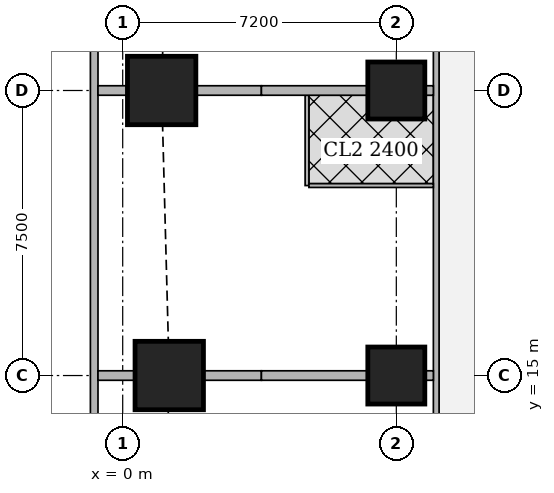
"""IFC4 building model, lengths in metres.
Left out: names, types, materials, properties, quantities, classifications, styles, units other than length and angle.
Written with IfcOpenShell. Run it as: python <this file> out.ifc"""

import sys

from ifc_helpers import new_model, si_unit, direction, frame, frame_2d, origin, origin_2d, place, context, subcontext, project, spatial, rectangle, extrude, element, fill, save


model = new_model("IFC4")
c1 = context("Model", 3, precision=1e-05, world=origin(), true_north=direction((0.0, 1.0)))
c2 = subcontext(c1, "Body", "Model", "MODEL_VIEW")
j1 = project(units=[si_unit("LENGTHUNIT", "METRE"), si_unit("PLANEANGLEUNIT", "RADIAN")], contexts=[c1])
p1 = place(None, origin())
s1 = spatial("IfcSite", under=j1, at=p1, CompositionType="ELEMENT")
p2 = place(p1, origin())
s2 = spatial("IfcBuilding", under=s1, at=p2, CompositionType="ELEMENT")
p3 = place(p2, frame((0.0, 0.0, 169.55)))
s3 = spatial("IfcBuildingStorey", under=s2, at=p3, CompositionType="ELEMENT", Elevation=169.55)
p4 = place(p3, frame((1.225, 15.0, 0.0), z_axis=(0.0, 0.0, 1.0), x_axis=(1.0, 0.0, 0.0)))
e1 = element("IfcColumn", 1, at=p4, inside=s3, PredefinedType="COLUMN", context=c2, shape_type="SweptSolid", body=[
    extrude(rectangle(XDim=1.8, YDim=1.8, at=origin_2d()), origin(), (0.0, 0.0, 1.0), 3.75),
])
p5 = place(p3, frame((7.2, 15.0, 0.0), z_axis=(0.0, 0.0, 1.0), x_axis=(1.0, 0.0, 0.0)))
e2 = element("IfcColumn", 2, at=p5, inside=s3, PredefinedType="COLUMN", context=c2, shape_type="SweptSolid", body=[
    extrude(rectangle(XDim=1.5, YDim=1.5, at=origin_2d()), origin(), (0.0, 0.0, 1.0), 3.75),
])
p6 = place(p3, frame((1.025, 22.5, 0.0), z_axis=(0.0, 0.0, 1.0), x_axis=(1.0, 0.0, 0.0)))
e3 = element("IfcColumn", 3, at=p6, inside=s3, PredefinedType="COLUMN", context=c2, shape_type="SweptSolid", body=[
    extrude(rectangle(XDim=1.8, YDim=1.8, at=origin_2d()), origin(), (0.0, 0.0, 1.0), 3.75),
])
p7 = place(p3, frame((7.2, 22.5, 0.0), z_axis=(0.0, 0.0, 1.0), x_axis=(1.0, 0.0, 0.0)))
e4 = element("IfcColumn", 4, at=p7, inside=s3, PredefinedType="COLUMN", context=c2, shape_type="SweptSolid", body=[
    extrude(rectangle(XDim=1.5, YDim=1.5, at=origin_2d()), origin(), (0.0, 0.0, 1.0), 3.75),
])
p8 = place(p3, frame((-0.75, 42.837, 0.0), z_axis=(0.0, 0.0, 1.0), x_axis=(0.0, -1.0, 0.0)))
e5 = element("IfcWall", 5, at=p8, inside=s3, PredefinedType="SOLIDWALL", context=c2, shape_type="SweptSolid", body=[
    extrude(rectangle(XDim=40.674, YDim=0.2, at=frame_2d((20.337, 0.0))), origin(), (0.0, 0.0, 1.0), 3.5),
])
p9 = place(p8, frame((1.78, 0.0, 0.9)))
e6 = element("IfcOpeningElement", 6, at=p9, cuts=e5, PredefinedType="OPENING", context=c2, shape_type="SweptSolid", body=[
    extrude(rectangle(XDim=1.8, YDim=1.5, at=frame_2d((0.9, 0.75))), frame((0.0, 0.11, 0.0), z_axis=(0.0, -1.0, 0.0), x_axis=(1.0, 0.0, 0.0)), (0.0, 0.0, 1.0), 0.22),
])
p10 = place(p8, frame((6.312, 0.0, 0.9)))
e7 = element("IfcOpeningElement", 7, at=p10, cuts=e5, PredefinedType="OPENING", context=c2, shape_type="SweptSolid", body=[
    extrude(rectangle(XDim=1.8, YDim=1.5, at=frame_2d((0.9, 0.75))), frame((0.0, 0.11, 0.0), z_axis=(0.0, -1.0, 0.0), x_axis=(1.0, 0.0, 0.0)), (0.0, 0.0, 1.0), 0.22),
])
p11 = place(p8, frame((10.062, 0.0, 0.9)))
e8 = element("IfcOpeningElement", 8, at=p11, cuts=e5, PredefinedType="OPENING", context=c2, shape_type="SweptSolid", body=[
    extrude(rectangle(XDim=1.8, YDim=1.5, at=frame_2d((0.9, 0.75))), frame((0.0, 0.11, 0.0), z_axis=(0.0, -1.0, 0.0), x_axis=(1.0, 0.0, 0.0)), (0.0, 0.0, 1.0), 0.22),
])
p12 = place(p8, frame((13.812, 0.0, 0.9)))
e9 = element("IfcOpeningElement", 9, at=p12, cuts=e5, PredefinedType="OPENING", context=c2, shape_type="SweptSolid", body=[
    extrude(rectangle(XDim=1.8, YDim=1.5, at=frame_2d((0.9, 0.75))), frame((0.0, 0.11, 0.0), z_axis=(0.0, -1.0, 0.0), x_axis=(1.0, 0.0, 0.0)), (0.0, 0.0, 1.0), 0.22),
])
p13 = place(p8, frame((17.562, 0.0, 0.9)))
e10 = element("IfcOpeningElement", 10, at=p13, cuts=e5, PredefinedType="OPENING", context=c2, shape_type="SweptSolid", body=[
    extrude(rectangle(XDim=1.8, YDim=1.5, at=frame_2d((0.9, 0.75))), frame((0.0, 0.11, 0.0), z_axis=(0.0, -1.0, 0.0), x_axis=(1.0, 0.0, 0.0)), (0.0, 0.0, 1.0), 0.22),
])
p14 = place(p8, frame((21.312, 0.0, 0.9)))
e11 = element("IfcOpeningElement", 11, at=p14, cuts=e5, PredefinedType="OPENING", context=c2, shape_type="SweptSolid", body=[
    extrude(rectangle(XDim=1.8, YDim=1.5, at=frame_2d((0.9, 0.75))), frame((0.0, 0.11, 0.0), z_axis=(0.0, -1.0, 0.0), x_axis=(1.0, 0.0, 0.0)), (0.0, 0.0, 1.0), 0.22),
])
p15 = place(p8, frame((25.062, 0.0, 0.9)))
e12 = element("IfcOpeningElement", 12, at=p15, cuts=e5, PredefinedType="OPENING", context=c2, shape_type="SweptSolid", body=[
    extrude(rectangle(XDim=1.8, YDim=1.5, at=frame_2d((0.9, 0.75))), frame((0.0, 0.11, 0.0), z_axis=(0.0, -1.0, 0.0), x_axis=(1.0, 0.0, 0.0)), (0.0, 0.0, 1.0), 0.22),
])
p16 = place(p8, frame((28.812, 0.0, 0.9)))
e13 = element("IfcOpeningElement", 13, at=p16, cuts=e5, PredefinedType="OPENING", context=c2, shape_type="SweptSolid", body=[
    extrude(rectangle(XDim=1.8, YDim=1.5, at=frame_2d((0.9, 0.75))), frame((0.0, 0.11, 0.0), z_axis=(0.0, -1.0, 0.0), x_axis=(1.0, 0.0, 0.0)), (0.0, 0.0, 1.0), 0.22),
])
p17 = place(p8, frame((32.562, 0.0, 0.9)))
e14 = element("IfcOpeningElement", 14, at=p17, cuts=e5, PredefinedType="OPENING", context=c2, shape_type="SweptSolid", body=[
    extrude(rectangle(XDim=1.8, YDim=1.5, at=frame_2d((0.9, 0.75))), frame((0.0, 0.11, 0.0), z_axis=(0.0, -1.0, 0.0), x_axis=(1.0, 0.0, 0.0)), (0.0, 0.0, 1.0), 0.22),
])
p18 = place(p8, frame((37.094, 0.0, 0.9)))
e15 = element("IfcOpeningElement", 15, at=p18, cuts=e5, PredefinedType="OPENING", context=c2, shape_type="SweptSolid", body=[
    extrude(rectangle(XDim=1.8, YDim=1.5, at=frame_2d((0.9, 0.75))), frame((0.0, 0.11, 0.0), z_axis=(0.0, -1.0, 0.0), x_axis=(1.0, 0.0, 0.0)), (0.0, 0.0, 1.0), 0.22),
])
p19 = place(p3, frame((8.25, 1.957, 0.0), z_axis=(0.0, 0.0, 1.0), x_axis=(0.0, 1.0, 0.0)))
e16 = element("IfcWall", 16, at=p19, inside=s3, PredefinedType="SOLIDWALL", context=c2, shape_type="SweptSolid", body=[
    extrude(rectangle(XDim=41.111, YDim=0.15, at=frame_2d((20.556, 0.0))), origin(), (0.0, 0.0, 1.0), 3.5),
])
p20 = place(p19, frame((10.642, 0.0, 0.0)))
e17 = element("IfcOpeningElement", 17, at=p20, cuts=e16, PredefinedType="OPENING", context=c2, shape_type="SweptSolid", body=[
    extrude(rectangle(XDim=1.0, YDim=2.1, at=frame_2d((0.5, 1.05))), frame((0.0, 0.085, 0.0), z_axis=(0.0, -1.0, 0.0), x_axis=(1.0, 0.0, 0.0)), (0.0, 0.0, 1.0), 0.17),
])
p21 = place(p19, frame((15.042, 0.0, 0.0)))
e18 = element("IfcOpeningElement", 18, at=p21, cuts=e16, PredefinedType="OPENING", context=c2, shape_type="SweptSolid", body=[
    extrude(rectangle(XDim=1.0, YDim=2.1, at=frame_2d((0.5, 1.05))), frame((0.0, 0.085, 0.0), z_axis=(0.0, -1.0, 0.0), x_axis=(1.0, 0.0, 0.0)), (0.0, 0.0, 1.0), 0.17),
])
p22 = place(p19, frame((22.543, 0.0, 0.0)))
e19 = element("IfcOpeningElement", 19, at=p22, cuts=e16, PredefinedType="OPENING", context=c2, shape_type="SweptSolid", body=[
    extrude(rectangle(XDim=1.0, YDim=2.1, at=frame_2d((0.5, 1.05))), frame((0.0, 0.085, 0.0), z_axis=(0.0, -1.0, 0.0), x_axis=(1.0, 0.0, 0.0)), (0.0, 0.0, 1.0), 0.17),
])
p23 = place(p19, frame((33.142, 0.0, 0.0)))
e20 = element("IfcOpeningElement", 20, at=p23, cuts=e16, PredefinedType="OPENING", context=c2, shape_type="SweptSolid", body=[
    extrude(rectangle(XDim=1.0, YDim=2.1, at=frame_2d((0.5, 1.05))), frame((0.0, 0.085, 0.0), z_axis=(0.0, -1.0, 0.0), x_axis=(1.0, 0.0, 0.0)), (0.0, 0.0, 1.0), 0.17),
])
p24 = place(p3, frame((4.85, 19.999, 0.0), z_axis=(0.0, 0.0, 1.0), x_axis=(0.0, 1.0, 0.0)))
e21 = element("IfcWall", 21, at=p24, inside=s3, PredefinedType="PARTITIONING", context=c2, shape_type="SweptSolid", body=[
    extrude(rectangle(XDim=2.376, YDim=0.1, at=frame_2d((1.188, 0.0))), origin(), (0.0, 0.0, 1.0), 3.5),
])
p25 = place(p24, frame((0.8, 0.0, 0.0)))
e22 = element("IfcOpeningElement", 22, at=p25, cuts=e21, PredefinedType="OPENING", context=c2, shape_type="SweptSolid", body=[
    extrude(rectangle(XDim=0.9, YDim=2.1, at=frame_2d((0.45, 1.05))), frame((0.0, 0.06, 0.0), z_axis=(0.0, -1.0, 0.0), x_axis=(1.0, 0.0, 0.0)), (0.0, 0.0, 1.0), 0.12),
])
p26 = place(p3, frame((4.9, 19.999, 0.0), z_axis=(0.0, 0.0, 1.0), x_axis=(1.0, 0.0, 0.0)))
e23 = element("IfcWall", 23, at=p26, inside=s3, PredefinedType="PARTITIONING", context=c2, shape_type="SweptSolid", body=[
    extrude(rectangle(XDim=3.275, YDim=0.1, at=frame_2d((1.638, 0.0))), origin(), (0.0, 0.0, 1.0), 3.5),
])
p27 = place(p3, frame((-0.65, 15.0, 0.0), z_axis=(0.0, 0.0, 1.0), x_axis=(1.0, 0.0, 0.0)))
e24 = element("IfcWall", 24, at=p27, inside=s3, PredefinedType="SOLIDWALL", context=c2, shape_type="SweptSolid", body=[
    extrude(rectangle(XDim=0.974, YDim=0.25, at=frame_2d((0.487, 0.0))), origin(), (0.0, 0.0, 1.0), 2.1),
])
p28 = place(p3, frame((2.126, 15.0, 0.0), z_axis=(0.0, 0.0, 1.0), x_axis=(1.0, 0.0, 0.0)))
e25 = element("IfcWall", 25, at=p28, inside=s3, PredefinedType="SOLIDWALL", context=c2, shape_type="SweptSolid", body=[
    extrude(rectangle(XDim=1.524, YDim=0.25, at=frame_2d((0.762, 0.0))), origin(), (0.0, 0.0, 1.0), 2.1),
])
p29 = place(p3, frame((3.65, 15.0, 0.0), z_axis=(0.0, 0.0, 1.0), x_axis=(1.0, 0.0, 0.0)))
e26 = element("IfcWall", 26, at=p29, inside=s3, PredefinedType="SOLIDWALL", context=c2, shape_type="SweptSolid", body=[
    extrude(rectangle(XDim=2.799, YDim=0.25, at=frame_2d((1.399, 0.0))), origin(), (0.0, 0.0, 1.0), 3.5),
])
p30 = place(p3, frame((7.951, 15.0, 0.0), z_axis=(0.0, 0.0, 1.0), x_axis=(1.0, 0.0, 0.0)))
e27 = element("IfcWall", 27, at=p30, inside=s3, PredefinedType="SOLIDWALL", context=c2, shape_type="SweptSolid", body=[
    extrude(rectangle(XDim=0.224, YDim=0.25, at=frame_2d((0.112, 0.0))), origin(), (0.0, 0.0, 1.0), 3.5),
])
p31 = place(p3, frame((-0.65, 22.5, 0.0), z_axis=(0.0, 0.0, 1.0), x_axis=(1.0, 0.0, 0.0)))
e28 = element("IfcWall", 28, at=p31, inside=s3, PredefinedType="SOLIDWALL", context=c2, shape_type="SweptSolid", body=[
    extrude(rectangle(XDim=0.774, YDim=0.25, at=frame_2d((0.387, 0.0))), origin(), (0.0, 0.0, 1.0), 2.1),
])
p32 = place(p3, frame((1.926, 22.5, 0.0), z_axis=(0.0, 0.0, 1.0), x_axis=(1.0, 0.0, 0.0)))
e29 = element("IfcWall", 29, at=p32, inside=s3, PredefinedType="SOLIDWALL", context=c2, shape_type="SweptSolid", body=[
    extrude(rectangle(XDim=1.724, YDim=0.25, at=frame_2d((0.862, 0.0))), origin(), (0.0, 0.0, 1.0), 2.1),
])
p33 = place(p3, frame((3.65, 22.5, 0.0), z_axis=(0.0, 0.0, 1.0), x_axis=(1.0, 0.0, 0.0)))
e30 = element("IfcWall", 30, at=p33, inside=s3, PredefinedType="SOLIDWALL", context=c2, shape_type="SweptSolid", body=[
    extrude(rectangle(XDim=2.799, YDim=0.25, at=frame_2d((1.399, 0.0))), origin(), (0.0, 0.0, 1.0), 3.5),
])
p34 = place(p3, frame((7.951, 22.5, 0.0), z_axis=(0.0, 0.0, 1.0), x_axis=(1.0, 0.0, 0.0)))
e31 = element("IfcWall", 31, at=p34, inside=s3, PredefinedType="SOLIDWALL", context=c2, shape_type="SweptSolid", body=[
    extrude(rectangle(XDim=0.224, YDim=0.25, at=frame_2d((0.112, 0.0))), origin(), (0.0, 0.0, 1.0), 3.5),
])
p35 = place(p13, origin())
e32 = element("IfcWindow", 32, at=p35, inside=s3, PartitioningType="SINGLE_PANEL", PredefinedType="WINDOW", context=c2, shape_type="SweptSolid", body=[
    extrude(rectangle(XDim=1.8, YDim=1.5, at=frame_2d((0.9, 0.75))), frame((0.0, 0.03, 0.0), z_axis=(0.0, -1.0, 0.0), x_axis=(1.0, 0.0, 0.0)), (0.0, 0.0, 1.0), 0.06),
])
fill(e10, e32)
p36 = place(p14, origin())
e33 = element("IfcWindow", 33, at=p36, inside=s3, PartitioningType="SINGLE_PANEL", PredefinedType="WINDOW", context=c2, shape_type="SweptSolid", body=[
    extrude(rectangle(XDim=1.8, YDim=1.5, at=frame_2d((0.9, 0.75))), frame((0.0, 0.03, 0.0), z_axis=(0.0, -1.0, 0.0), x_axis=(1.0, 0.0, 0.0)), (0.0, 0.0, 1.0), 0.06),
])
fill(e11, e33)
p37 = place(p15, origin())
e34 = element("IfcWindow", 34, at=p37, inside=s3, PartitioningType="SINGLE_PANEL", PredefinedType="WINDOW", context=c2, shape_type="SweptSolid", body=[
    extrude(rectangle(XDim=1.8, YDim=1.5, at=frame_2d((0.9, 0.75))), frame((0.0, 0.03, 0.0), z_axis=(0.0, -1.0, 0.0), x_axis=(1.0, 0.0, 0.0)), (0.0, 0.0, 1.0), 0.06),
])
fill(e12, e34)
p38 = place(p16, origin())
e35 = element("IfcWindow", 35, at=p38, inside=s3, PartitioningType="SINGLE_PANEL", PredefinedType="WINDOW", context=c2, shape_type="SweptSolid", body=[
    extrude(rectangle(XDim=1.8, YDim=1.5, at=frame_2d((0.9, 0.75))), frame((0.0, 0.03, 0.0), z_axis=(0.0, -1.0, 0.0), x_axis=(1.0, 0.0, 0.0)), (0.0, 0.0, 1.0), 0.06),
])
fill(e13, e35)
p39 = place(p25, origin())
e36 = element("IfcDoor", 36, at=p39, inside=s3, OperationType="SINGLE_SWING_LEFT", PredefinedType="DOOR", context=c2, shape_type="SweptSolid", body=[
    extrude(rectangle(XDim=0.9, YDim=2.1, at=frame_2d((0.45, 1.05))), frame((0.0, 0.025, 0.0), z_axis=(0.0, -1.0, 0.0), x_axis=(1.0, 0.0, 0.0)), (0.0, 0.0, 1.0), 0.05),
])
fill(e22, e36)
p40 = place(p21, origin())
e37 = element("IfcDoor", 37, at=p40, inside=s3, OperationType="SINGLE_SWING_LEFT", PredefinedType="DOOR", context=c2, shape_type="SweptSolid", body=[
    extrude(rectangle(XDim=1.0, YDim=2.1, at=frame_2d((0.5, 1.05))), frame((0.0, 0.025, 0.0), z_axis=(0.0, -1.0, 0.0), x_axis=(1.0, 0.0, 0.0)), (0.0, 0.0, 1.0), 0.05),
])
fill(e18, e37)
save(model, sys.argv[1])
